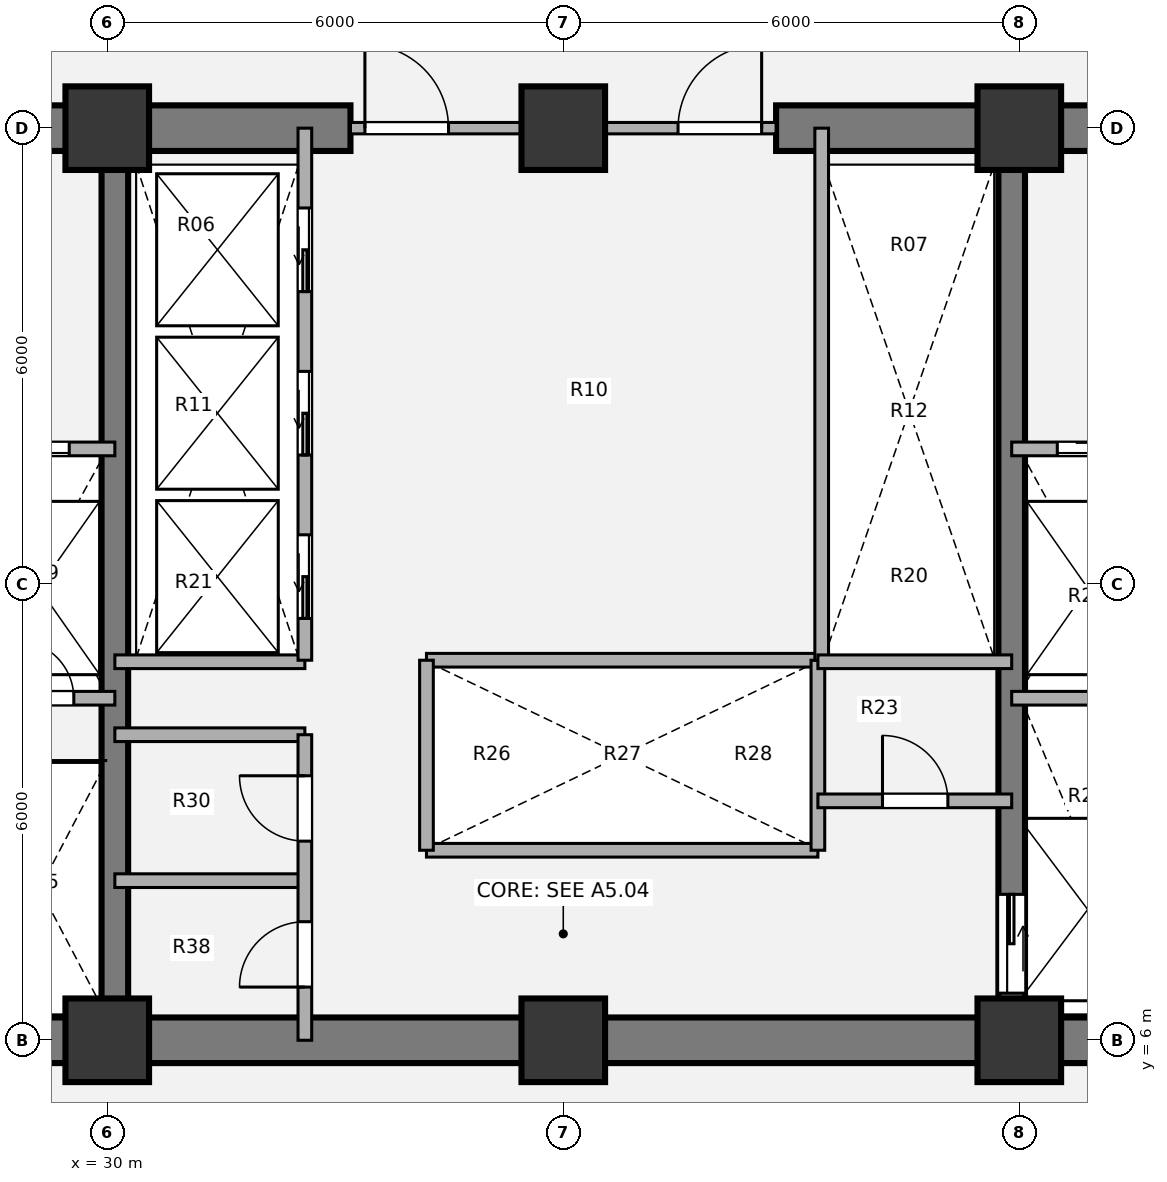
"""IFC4 building model, lengths in metres.
Left out: names, types, materials, properties, quantities, classifications, styles, units other than length and angle.
Written with IfcOpenShell. Run it as: python <this file> out.ifc"""

import sys

from ifc_helpers import new_model, si_unit, direction, frame, frame_2d, origin, origin_2d, place, context, subcontext, project, spatial, rectangle, extrude, source, transform, mapped, element, fill, save


model = new_model("IFC4")
c1 = context("Model", 3, precision=1e-05, world=origin(), true_north=direction((0.0, 1.0)))
c2 = subcontext(c1, "Body", "Model", "MODEL_VIEW")
j1 = project(units=[si_unit("LENGTHUNIT", "METRE"), si_unit("PLANEANGLEUNIT", "RADIAN")], contexts=[c1])
p1 = place(None, origin())
s1 = spatial("IfcSite", under=j1, at=p1, CompositionType="ELEMENT")
p2 = place(p1, origin())
s2 = spatial("IfcBuilding", under=s1, at=p2, CompositionType="ELEMENT")
p3 = place(p2, frame((0.0, 0.0, 45.9)))
s3 = spatial("IfcBuildingStorey", under=s2, at=p3, CompositionType="ELEMENT", Elevation=45.9)
m1 = source(origin(), c2, "Body", "SweptSolid", [
    extrude(rectangle(XDim=1.1, YDim=1.1, at=origin_2d()), origin(), (0.0, 0.0, 1.0), 3.78),
])
for number, where, z_axis, x_axis in (
    (1, (30.0, 6.0, 0.0), (0.0, 0.0, 1.0), (1.0, 0.0, 0.0)),
    (2, (36.0, 6.0, 0.0), (0.0, 0.0, 1.0), (1.0, 0.0, 0.0)),
    (3, (42.0, 6.0, 0.0), (0.0, 0.0, 1.0), (1.0, 0.0, 0.0)),
    (4, (30.0, 18.0, 0.0), (0.0, 0.0, 1.0), (1.0, 0.0, 0.0)),
    (5, (36.0, 18.0, 0.0), (0.0, 0.0, 1.0), (1.0, 0.0, 0.0)),
    (6, (42.0, 18.0, 0.0), (0.0, 0.0, 1.0), (1.0, 0.0, 0.0)),
):
    element("IfcColumn", number, at=place(p3, frame(where, z_axis=z_axis, x_axis=x_axis)), inside=s3, PredefinedType="COLUMN", context=c2, shape_type="MappedRepresentation", body=[
        mapped(m1, transform((0.0, 0.0, 0.0), x_axis=(1.0, 0.0, 0.0), y_axis=(0.0, 1.0, 0.0), z_axis=(0.0, 0.0, 1.0), scale=1.0)),
    ])
p4 = place(p3, frame((48.3, 6.0, 0.0), z_axis=(0.0, 0.0, 1.0), x_axis=(-1.0, 0.0, 0.0)))
e7 = element("IfcWall", 7, at=p4, inside=s3, PredefinedType="SHEAR", context=c2, shape_type="SweptSolid", body=[
    extrude(rectangle(XDim=24.6, YDim=0.6, at=frame_2d((12.3, 0.0))), origin(), (0.0, 0.0, 1.0), 3.78),
])
p5 = place(p3, frame((23.7, 18.0, 0.0), z_axis=(0.0, 0.0, 1.0), x_axis=(1.0, 0.0, 0.0)))
e8 = element("IfcWall", 8, at=p5, inside=s3, PredefinedType="SHEAR", context=c2, shape_type="SweptSolid", body=[
    extrude(rectangle(XDim=9.5, YDim=0.6, at=frame_2d((4.75, 0.0))), origin(), (0.0, 0.0, 1.0), 3.78),
])
p6 = place(p5, frame((2.95, 0.0, 0.0)))
e9 = element("IfcOpeningElement", 9, at=p6, cuts=e8, PredefinedType="OPENING", context=c2, shape_type="SweptSolid", body=[
    extrude(rectangle(XDim=1.1, YDim=2.1, at=origin_2d()), frame((0.55, 0.31, 1.05), z_axis=(0.0, -1.0, 0.0), x_axis=(1.0, 0.0, 0.0)), (0.0, 0.0, 1.0), 0.62),
])
p7 = place(p3, frame((38.8, 18.0, 0.0), z_axis=(0.0, 0.0, 1.0), x_axis=(1.0, 0.0, 0.0)))
e10 = element("IfcWall", 10, at=p7, inside=s3, PredefinedType="SHEAR", context=c2, shape_type="SweptSolid", body=[
    extrude(rectangle(XDim=9.5, YDim=0.6, at=frame_2d((4.75, 0.0))), origin(), (0.0, 0.0, 1.0), 3.78),
])
p8 = place(p7, frame((5.45, 0.0, 0.0)))
e11 = element("IfcOpeningElement", 11, at=p8, cuts=e10, PredefinedType="OPENING", context=c2, shape_type="SweptSolid", body=[
    extrude(rectangle(XDim=1.1, YDim=2.1, at=origin_2d()), frame((0.55, 0.31, 1.05), z_axis=(0.0, -1.0, 0.0), x_axis=(1.0, 0.0, 0.0)), (0.0, 0.0, 1.0), 0.62),
])
p9 = place(p3, frame((30.1, 6.0, 0.0), z_axis=(0.0, 0.0, 1.0), x_axis=(0.0, 1.0, 0.0)))
e12 = element("IfcWall", 12, at=p9, inside=s3, PredefinedType="SHEAR", context=c2, shape_type="SweptSolid", body=[
    extrude(rectangle(XDim=12.0, YDim=0.35, at=frame_2d((6.0, 0.0))), origin(), (0.0, 0.0, 1.0), 3.78),
])
p10 = place(p3, frame((41.9, 18.0, 0.0), z_axis=(0.0, 0.0, 1.0), x_axis=(0.0, -1.0, 0.0)))
e13 = element("IfcWall", 13, at=p10, inside=s3, PredefinedType="SHEAR", context=c2, shape_type="SweptSolid", body=[
    extrude(rectangle(XDim=12.0, YDim=0.35, at=frame_2d((6.0, 0.0))), origin(), (0.0, 0.0, 1.0), 3.78),
])
p11 = place(p10, frame((10.08, 0.0, 0.0)))
e14 = element("IfcOpeningElement", 14, at=p11, cuts=e13, PredefinedType="OPENING", context=c2, shape_type="SweptSolid", body=[
    extrude(rectangle(XDim=1.3, YDim=2.1, at=origin_2d()), frame((0.65, 0.185, 1.05), z_axis=(0.0, -1.0, 0.0), x_axis=(1.0, 0.0, 0.0)), (0.0, 0.0, 1.0), 0.37),
])
for number, where, z_axis, x_axis in (
    (15, (34.2, 11.0, 0.0), (0.0, 0.0, 1.0), (1.0, 0.0, 0.0)),
    (16, (34.2, 8.5, 0.0), (0.0, 0.0, 1.0), (1.0, 0.0, 0.0)),
):
    element("IfcWall", number, at=place(p3, frame(where, z_axis=z_axis, x_axis=x_axis)), inside=s3, PredefinedType="PARTITIONING", context=c2, shape_type="SweptSolid", body=[
        extrude(rectangle(XDim=5.15, YDim=0.18, at=frame_2d((2.575, 0.0))), origin(), (0.0, 0.0, 1.0), 3.5),
    ])
for number, where, z_axis, x_axis in (
    (17, (34.2, 8.5, 0.0), (0.0, 0.0, 1.0), (0.0, 1.0, 0.0)),
    (18, (39.35, 8.5, 0.0), (0.0, 0.0, 1.0), (0.0, 1.0, 0.0)),
):
    element("IfcWall", number, at=place(p3, frame(where, z_axis=z_axis, x_axis=x_axis)), inside=s3, PredefinedType="PARTITIONING", context=c2, shape_type="SweptSolid", body=[
        extrude(rectangle(XDim=2.5, YDim=0.18, at=frame_2d((1.25, 0.0))), origin(), (0.0, 0.0, 1.0), 3.5),
    ])
p12 = place(p3, frame((39.4, 11.0, 0.0), z_axis=(0.0, 0.0, 1.0), x_axis=(0.0, 1.0, 0.0)))
e19 = element("IfcWall", 19, at=p12, inside=s3, PredefinedType="PARTITIONING", context=c2, shape_type="SweptSolid", body=[
    extrude(rectangle(XDim=7.0, YDim=0.18, at=frame_2d((3.5, 0.0))), origin(), (0.0, 0.0, 1.0), 3.5),
])
p13 = place(p3, frame((30.1, 10.98, 0.0), z_axis=(0.0, 0.0, 1.0), x_axis=(1.0, 0.0, 0.0)))
e20 = element("IfcWall", 20, at=p13, inside=s3, PredefinedType="PARTITIONING", context=c2, shape_type="SweptSolid", body=[
    extrude(rectangle(XDim=2.5, YDim=0.18, at=frame_2d((1.25, 0.0))), origin(), (0.0, 0.0, 1.0), 3.5),
])
p14 = place(p3, frame((39.35, 10.98, 0.0), z_axis=(0.0, 0.0, 1.0), x_axis=(1.0, 0.0, 0.0)))
e21 = element("IfcWall", 21, at=p14, inside=s3, PredefinedType="PARTITIONING", context=c2, shape_type="SweptSolid", body=[
    extrude(rectangle(XDim=2.55, YDim=0.18, at=frame_2d((1.275, 0.0))), origin(), (0.0, 0.0, 1.0), 3.5),
])
for number, where, z_axis, x_axis in (
    (22, (30.1, 8.1, 0.0), (0.0, 0.0, 1.0), (1.0, 0.0, 0.0)),
    (23, (30.1, 10.02, 0.0), (0.0, 0.0, 1.0), (1.0, 0.0, 0.0)),
):
    element("IfcWall", number, at=place(p3, frame(where, z_axis=z_axis, x_axis=x_axis)), inside=s3, PredefinedType="PARTITIONING", context=c2, shape_type="SweptSolid", body=[
        extrude(rectangle(XDim=2.5, YDim=0.18, at=frame_2d((1.25, 0.0))), origin(), (0.0, 0.0, 1.0), 3.5),
    ])
p15 = place(p3, frame((32.6, 6.0, 0.0), z_axis=(0.0, 0.0, 1.0), x_axis=(0.0, 1.0, 0.0)))
e24 = element("IfcWall", 24, at=p15, inside=s3, PredefinedType="PARTITIONING", context=c2, shape_type="SweptSolid", body=[
    extrude(rectangle(XDim=4.02, YDim=0.18, at=frame_2d((2.01, 0.0))), origin(), (0.0, 0.0, 1.0), 3.5),
])
p16 = place(p15, frame((0.7, 0.0, 0.0)))
e25 = element("IfcOpeningElement", 25, at=p16, cuts=e24, PredefinedType="OPENING", context=c2, shape_type="SweptSolid", body=[
    extrude(rectangle(XDim=0.86, YDim=2.1, at=origin_2d()), frame((0.43, 0.1, 1.05), z_axis=(0.0, -1.0, 0.0), x_axis=(1.0, 0.0, 0.0)), (0.0, 0.0, 1.0), 0.2),
])
p17 = place(p15, frame((2.62, 0.0, 0.0)))
e26 = element("IfcOpeningElement", 26, at=p17, cuts=e24, PredefinedType="OPENING", context=c2, shape_type="SweptSolid", body=[
    extrude(rectangle(XDim=0.86, YDim=2.1, at=origin_2d()), frame((0.43, 0.1, 1.05), z_axis=(0.0, -1.0, 0.0), x_axis=(1.0, 0.0, 0.0)), (0.0, 0.0, 1.0), 0.2),
])
p18 = place(p3, frame((39.35, 9.15, 0.0), z_axis=(0.0, 0.0, 1.0), x_axis=(1.0, 0.0, 0.0)))
e27 = element("IfcWall", 27, at=p18, inside=s3, PredefinedType="PARTITIONING", context=c2, shape_type="SweptSolid", body=[
    extrude(rectangle(XDim=2.55, YDim=0.18, at=frame_2d((1.275, 0.0))), origin(), (0.0, 0.0, 1.0), 3.5),
])
p19 = place(p18, frame((0.85, 0.0, 0.0)))
e28 = element("IfcOpeningElement", 28, at=p19, cuts=e27, PredefinedType="OPENING", context=c2, shape_type="SweptSolid", body=[
    extrude(rectangle(XDim=0.86, YDim=2.1, at=origin_2d()), frame((0.43, 0.1, 1.05), z_axis=(0.0, -1.0, 0.0), x_axis=(1.0, 0.0, 0.0)), (0.0, 0.0, 1.0), 0.2),
])
p20 = place(p3, frame((33.2, 18.0, 0.0), z_axis=(0.0, 0.0, 1.0), x_axis=(1.0, 0.0, 0.0)))
e29 = element("IfcWall", 29, at=p20, inside=s3, PredefinedType="PARTITIONING", context=c2, shape_type="SweptSolid", body=[
    extrude(rectangle(XDim=5.6, YDim=0.15, at=frame_2d((2.8, 0.0))), origin(), (0.0, 0.0, 1.0), 2.315),
])
p21 = place(p20, frame((0.19, 0.0, 0.0)))
e30 = element("IfcOpeningElement", 30, at=p21, cuts=e29, PredefinedType="OPENING", context=c2, shape_type="SweptSolid", body=[
    extrude(rectangle(XDim=1.1, YDim=2.1, at=origin_2d()), frame((0.55, 0.085, 1.05), z_axis=(0.0, -1.0, 0.0), x_axis=(1.0, 0.0, 0.0)), (0.0, 0.0, 1.0), 0.17),
])
p22 = place(p20, frame((4.31, 0.0, 0.0)))
e31 = element("IfcOpeningElement", 31, at=p22, cuts=e29, PredefinedType="OPENING", context=c2, shape_type="SweptSolid", body=[
    extrude(rectangle(XDim=1.1, YDim=2.1, at=origin_2d()), frame((0.55, 0.085, 1.05), z_axis=(0.0, -1.0, 0.0), x_axis=(1.0, 0.0, 0.0)), (0.0, 0.0, 1.0), 0.17),
])
p23 = place(p3, frame((24.0, 13.78, 0.0), z_axis=(0.0, 0.0, 1.0), x_axis=(1.0, 0.0, 0.0)))
e32 = element("IfcWall", 32, at=p23, inside=s3, PredefinedType="PARTITIONING", context=c2, shape_type="SweptSolid", body=[
    extrude(rectangle(XDim=6.1, YDim=0.18, at=frame_2d((3.05, 0.0))), origin(), (0.0, 0.0, 1.0), 3.5),
])
p24 = place(p23, frame((1.15, 0.0, 0.0)))
e33 = element("IfcOpeningElement", 33, at=p24, cuts=e32, PredefinedType="OPENING", context=c2, shape_type="SweptSolid", body=[
    extrude(rectangle(XDim=1.1, YDim=2.1, at=origin_2d()), frame((0.55, 0.1, 1.05), z_axis=(0.0, -1.0, 0.0), x_axis=(1.0, 0.0, 0.0)), (0.0, 0.0, 1.0), 0.2),
])
p25 = place(p23, frame((4.4, 0.0, 0.0)))
e34 = element("IfcOpeningElement", 34, at=p25, cuts=e32, PredefinedType="OPENING", context=c2, shape_type="SweptSolid", body=[
    extrude(rectangle(XDim=1.1, YDim=2.1, at=origin_2d()), frame((0.55, 0.1, 1.05), z_axis=(0.0, -1.0, 0.0), x_axis=(1.0, 0.0, 0.0)), (0.0, 0.0, 1.0), 0.2),
])
p26 = place(p3, frame((28.15, 10.5, 0.0), z_axis=(0.0, 0.0, 1.0), x_axis=(1.0, 0.0, 0.0)))
e35 = element("IfcWall", 35, at=p26, inside=s3, PredefinedType="PARTITIONING", context=c2, shape_type="SweptSolid", body=[
    extrude(rectangle(XDim=1.95, YDim=0.18, at=frame_2d((0.975, 0.0))), origin(), (0.0, 0.0, 1.0), 3.5),
])
p27 = place(p26, frame((0.65, 0.0, 0.0)))
e36 = element("IfcOpeningElement", 36, at=p27, cuts=e35, PredefinedType="OPENING", context=c2, shape_type="SweptSolid", body=[
    extrude(rectangle(XDim=0.76, YDim=2.05, at=origin_2d()), frame((0.38, 0.1, 1.025), z_axis=(0.0, -1.0, 0.0), x_axis=(1.0, 0.0, 0.0)), (0.0, 0.0, 1.0), 0.2),
])
p28 = place(p3, frame((41.9, 13.78, 0.0), z_axis=(0.0, 0.0, 1.0), x_axis=(1.0, 0.0, 0.0)))
e37 = element("IfcWall", 37, at=p28, inside=s3, PredefinedType="PARTITIONING", context=c2, shape_type="SweptSolid", body=[
    extrude(rectangle(XDim=6.1, YDim=0.18, at=frame_2d((3.05, 0.0))), origin(), (0.0, 0.0, 1.0), 3.5),
])
p29 = place(p28, frame((0.6, 0.0, 0.0)))
e38 = element("IfcOpeningElement", 38, at=p29, cuts=e37, PredefinedType="OPENING", context=c2, shape_type="SweptSolid", body=[
    extrude(rectangle(XDim=1.1, YDim=2.1, at=origin_2d()), frame((0.55, 0.1, 1.05), z_axis=(0.0, -1.0, 0.0), x_axis=(1.0, 0.0, 0.0)), (0.0, 0.0, 1.0), 0.2),
])
p30 = place(p28, frame((3.8, 0.0, 0.0)))
e39 = element("IfcOpeningElement", 39, at=p30, cuts=e37, PredefinedType="OPENING", context=c2, shape_type="SweptSolid", body=[
    extrude(rectangle(XDim=1.1, YDim=2.1, at=origin_2d()), frame((0.55, 0.1, 1.05), z_axis=(0.0, -1.0, 0.0), x_axis=(1.0, 0.0, 0.0)), (0.0, 0.0, 1.0), 0.2),
])
p31 = place(p3, frame((41.9, 10.5, 0.0), z_axis=(0.0, 0.0, 1.0), x_axis=(1.0, 0.0, 0.0)))
e40 = element("IfcWall", 40, at=p31, inside=s3, PredefinedType="PARTITIONING", context=c2, shape_type="SweptSolid", body=[
    extrude(rectangle(XDim=1.95, YDim=0.18, at=frame_2d((0.975, 0.0))), origin(), (0.0, 0.0, 1.0), 3.5),
])
p32 = place(p3, frame((32.6, 11.0, 0.0), z_axis=(0.0, 0.0, 1.0), x_axis=(0.0, 1.0, 0.0)))
e41 = element("IfcWall", 41, at=p32, inside=s3, PredefinedType="PARTITIONING", context=c2, shape_type="SweptSolid", body=[
    extrude(rectangle(XDim=7.0, YDim=0.18, at=frame_2d((3.5, 0.0))), origin(), (0.0, 0.0, 1.0), 3.5),
])
p33 = place(p32, frame((0.55, 0.0, 0.0)))
e42 = element("IfcOpeningElement", 42, at=p33, cuts=e41, PredefinedType="OPENING", context=c2, shape_type="SweptSolid", body=[
    extrude(rectangle(XDim=1.1, YDim=2.1, at=origin_2d()), frame((0.55, 0.1, 1.05), z_axis=(0.0, -1.0, 0.0), x_axis=(1.0, 0.0, 0.0)), (0.0, 0.0, 1.0), 0.2),
])
p34 = place(p32, frame((2.7, 0.0, 0.0)))
e43 = element("IfcOpeningElement", 43, at=p34, cuts=e41, PredefinedType="OPENING", context=c2, shape_type="SweptSolid", body=[
    extrude(rectangle(XDim=1.1, YDim=2.1, at=origin_2d()), frame((0.55, 0.1, 1.05), z_axis=(0.0, -1.0, 0.0), x_axis=(1.0, 0.0, 0.0)), (0.0, 0.0, 1.0), 0.2),
])
p35 = place(p32, frame((4.85, 0.0, 0.0)))
e44 = element("IfcOpeningElement", 44, at=p35, cuts=e41, PredefinedType="OPENING", context=c2, shape_type="SweptSolid", body=[
    extrude(rectangle(XDim=1.1, YDim=2.1, at=origin_2d()), frame((0.55, 0.1, 1.05), z_axis=(0.0, -1.0, 0.0), x_axis=(1.0, 0.0, 0.0)), (0.0, 0.0, 1.0), 0.2),
])
m2 = source(origin(), c2, "Body", "SweptSolid", [
    extrude(rectangle(XDim=0.86, YDim=2.1, at=origin_2d()), frame((0.43, 0.025, 1.05), z_axis=(0.0, -1.0, 0.0), x_axis=(1.0, 0.0, 0.0)), (0.0, 0.0, 1.0), 0.05),
])
p36 = place(p16, origin())
e45 = element("IfcDoor", 45, at=p36, inside=s3, OperationType="SINGLE_SWING_LEFT", PredefinedType="DOOR", context=c2, shape_type="MappedRepresentation", body=[
    mapped(m2, transform((0.0, 0.0, 0.0), x_axis=(1.0, 0.0, 0.0), y_axis=(0.0, 1.0, 0.0), z_axis=(0.0, 0.0, 1.0), scale=1.0)),
])
fill(e25, e45)
p37 = place(p17, origin())
e46 = element("IfcDoor", 46, at=p37, inside=s3, OperationType="SINGLE_SWING_RIGHT", PredefinedType="DOOR", context=c2, shape_type="MappedRepresentation", body=[
    mapped(m2, transform((0.0, 0.0, 0.0), x_axis=(1.0, 0.0, 0.0), y_axis=(0.0, 1.0, 0.0), z_axis=(0.0, 0.0, 1.0), scale=1.0)),
])
fill(e26, e46)
p38 = place(p19, origin())
e47 = element("IfcDoor", 47, at=p38, inside=s3, OperationType="SINGLE_SWING_LEFT", PredefinedType="DOOR", context=c2, shape_type="MappedRepresentation", body=[
    mapped(m2, transform((0.0, 0.0, 0.0), x_axis=(1.0, 0.0, 0.0), y_axis=(0.0, 1.0, 0.0), z_axis=(0.0, 0.0, 1.0), scale=1.0)),
])
fill(e28, e47)
m3 = source(origin(), c2, "Body", "SweptSolid", [
    extrude(rectangle(XDim=1.1, YDim=2.1, at=origin_2d()), frame((0.55, 0.025, 1.05), z_axis=(0.0, -1.0, 0.0), x_axis=(1.0, 0.0, 0.0)), (0.0, 0.0, 1.0), 0.05),
])
p39 = place(p21, origin())
e48 = element("IfcDoor", 48, at=p39, inside=s3, OperationType="SINGLE_SWING_LEFT", PredefinedType="DOOR", context=c2, shape_type="MappedRepresentation", body=[
    mapped(m3, transform((0.0, 0.0, 0.0), x_axis=(1.0, 0.0, 0.0), y_axis=(0.0, 1.0, 0.0), z_axis=(0.0, 0.0, 1.0), scale=1.0)),
])
fill(e30, e48)
p40 = place(p22, origin())
e49 = element("IfcDoor", 49, at=p40, inside=s3, OperationType="SINGLE_SWING_RIGHT", PredefinedType="DOOR", context=c2, shape_type="MappedRepresentation", body=[
    mapped(m3, transform((0.0, 0.0, 0.0), x_axis=(1.0, 0.0, 0.0), y_axis=(0.0, 1.0, 0.0), z_axis=(0.0, 0.0, 1.0), scale=1.0)),
])
fill(e31, e49)
m4 = source(origin(), c2, "Body", "SweptSolid", [
    extrude(rectangle(XDim=1.1, YDim=2.1, at=origin_2d()), frame((0.55, 0.025, 1.05), z_axis=(0.0, -1.0, 0.0), x_axis=(1.0, 0.0, 0.0)), (0.0, 0.0, 1.0), 0.05),
])
p41 = place(p25, origin())
e50 = element("IfcDoor", 50, at=p41, inside=s3, OperationType="SLIDING_TO_LEFT", PredefinedType="DOOR", context=c2, shape_type="MappedRepresentation", body=[
    mapped(m4, transform((0.0, 0.0, 0.0), x_axis=(1.0, 0.0, 0.0), y_axis=(0.0, 1.0, 0.0), z_axis=(0.0, 0.0, 1.0), scale=1.0)),
])
fill(e34, e50)
m5 = source(origin(), c2, "Body", "SweptSolid", [
    extrude(rectangle(XDim=0.76, YDim=2.05, at=origin_2d()), frame((0.38, 0.025, 1.025), z_axis=(0.0, -1.0, 0.0), x_axis=(1.0, 0.0, 0.0)), (0.0, 0.0, 1.0), 0.05),
])
p42 = place(p27, origin())
e51 = element("IfcDoor", 51, at=p42, inside=s3, OperationType="SINGLE_SWING_LEFT", PredefinedType="DOOR", context=c2, shape_type="MappedRepresentation", body=[
    mapped(m5, transform((0.0, 0.0, 0.0), x_axis=(1.0, 0.0, 0.0), y_axis=(0.0, 1.0, 0.0), z_axis=(0.0, 0.0, 1.0), scale=1.0)),
])
fill(e36, e51)
p43 = place(p29, origin())
e52 = element("IfcDoor", 52, at=p43, inside=s3, OperationType="SLIDING_TO_RIGHT", PredefinedType="DOOR", context=c2, shape_type="MappedRepresentation", body=[
    mapped(m4, transform((0.0, 0.0, 0.0), x_axis=(1.0, 0.0, 0.0), y_axis=(0.0, 1.0, 0.0), z_axis=(0.0, 0.0, 1.0), scale=1.0)),
])
fill(e38, e52)
m6 = source(origin(), c2, "Body", "SweptSolid", [
    extrude(rectangle(XDim=1.3, YDim=2.1, at=origin_2d()), frame((0.65, 0.025, 1.05), z_axis=(0.0, -1.0, 0.0), x_axis=(1.0, 0.0, 0.0)), (0.0, 0.0, 1.0), 0.05),
])
p44 = place(p11, origin())
e53 = element("IfcDoor", 53, at=p44, inside=s3, OperationType="SLIDING_TO_LEFT", PredefinedType="DOOR", context=c2, shape_type="MappedRepresentation", body=[
    mapped(m6, transform((0.0, 0.0, 0.0), x_axis=(1.0, 0.0, 0.0), y_axis=(0.0, 1.0, 0.0), z_axis=(0.0, 0.0, 1.0), scale=1.0)),
])
fill(e14, e53)
p45 = place(p33, origin())
e54 = element("IfcDoor", 54, at=p45, inside=s3, OperationType="SLIDING_TO_LEFT", PredefinedType="DOOR", context=c2, shape_type="MappedRepresentation", body=[
    mapped(m4, transform((0.0, 0.0, 0.0), x_axis=(1.0, 0.0, 0.0), y_axis=(0.0, 1.0, 0.0), z_axis=(0.0, 0.0, 1.0), scale=1.0)),
])
fill(e42, e54)
p46 = place(p34, origin())
e55 = element("IfcDoor", 55, at=p46, inside=s3, OperationType="SLIDING_TO_LEFT", PredefinedType="DOOR", context=c2, shape_type="MappedRepresentation", body=[
    mapped(m4, transform((0.0, 0.0, 0.0), x_axis=(1.0, 0.0, 0.0), y_axis=(0.0, 1.0, 0.0), z_axis=(0.0, 0.0, 1.0), scale=1.0)),
])
fill(e43, e55)
p47 = place(p35, origin())
e56 = element("IfcDoor", 56, at=p47, inside=s3, OperationType="SLIDING_TO_LEFT", PredefinedType="DOOR", context=c2, shape_type="MappedRepresentation", body=[
    mapped(m4, transform((0.0, 0.0, 0.0), x_axis=(1.0, 0.0, 0.0), y_axis=(0.0, 1.0, 0.0), z_axis=(0.0, 0.0, 1.0), scale=1.0)),
])
fill(e44, e56)
save(model, sys.argv[1])
